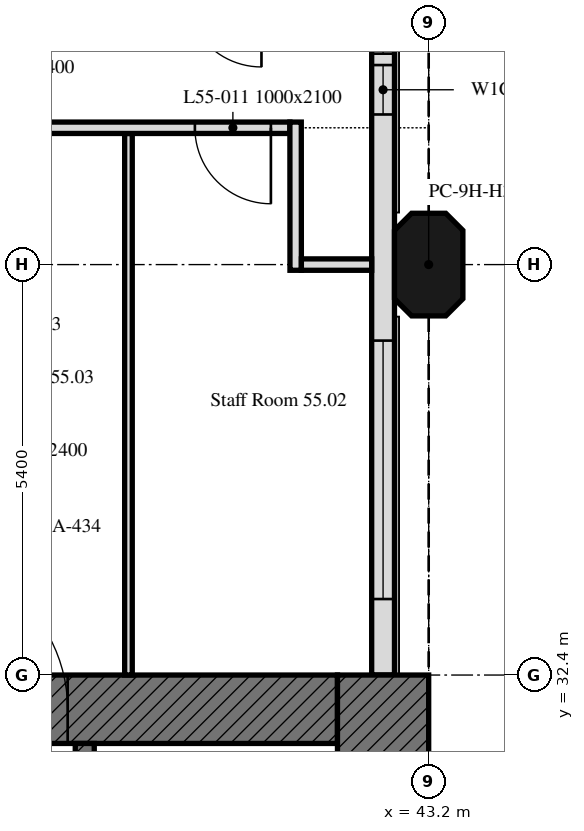
"""IFC4 building model, lengths in metres.
Left out: names, types, materials, properties, quantities, classifications, styles, units other than length and angle.
Written with IfcOpenShell. Run it as: python <this file> out.ifc"""

import sys

from ifc_helpers import new_model, si_unit, direction, frame, frame_2d, origin, place, context, subcontext, project, spatial, polyline, rectangle, outline, extrude, element, fill, save


model = new_model("IFC4")
c1 = context("Model", 3, precision=1e-05, world=origin(), true_north=direction((0.0, 1.0)))
c2 = subcontext(c1, "Body", "Model", "MODEL_VIEW")
j1 = project(units=[si_unit("LENGTHUNIT", "METRE"), si_unit("PLANEANGLEUNIT", "RADIAN")], contexts=[c1])
p1 = place(None, origin())
s1 = spatial("IfcSite", under=j1, at=p1, CompositionType="ELEMENT")
p2 = place(p1, origin())
s2 = spatial("IfcBuilding", under=s1, at=p2, CompositionType="ELEMENT")
p3 = place(p2, frame((0.0, 0.0, 220.3)))
s3 = spatial("IfcBuildingStorey", under=s2, at=p3, CompositionType="ELEMENT", Elevation=220.3)
p4 = place(p3, frame((43.2, 37.8, 0.0), z_axis=(0.0, 0.0, 1.0), x_axis=(0.0, 1.0, 0.0)))
e1 = element("IfcColumn", 1, at=p4, inside=s3, PredefinedType="COLUMN", context=c2, shape_type="SweptSolid", body=[
    extrude(outline(polyline([(-0.45, -0.45), (0.45, -0.45), (0.675, -0.225), (0.675, 0.225), (0.45, 0.45), (-0.45, 0.45), (-0.675, 0.225), (-0.675, -0.225), (-0.45, -0.45)])), origin(), (0.0, 0.0, 1.0), 3.0),
])
p5 = place(p3, frame((42.6, 32.4, 0.0), z_axis=(0.0, 0.0, 1.0), x_axis=(0.0, 1.0, 0.0)))
e2 = element("IfcWall", 2, at=p5, inside=s3, PredefinedType="SOLIDWALL", context=c2, shape_type="SweptSolid", body=[
    extrude(rectangle(XDim=10.614, YDim=0.3, at=frame_2d((5.307, 0.0))), origin(), (0.0, 0.0, 1.0), 3.0),
])
p6 = place(p5, frame((1.0, 0.0, 0.9)))
e3 = element("IfcOpeningElement", 3, at=p6, cuts=e2, PredefinedType="OPENING", context=c2, shape_type="SweptSolid", body=[
    extrude(rectangle(XDim=3.4, YDim=1.7, at=frame_2d((1.7, 0.85))), frame((0.0, 0.16, 0.0), z_axis=(0.0, -1.0, 0.0), x_axis=(1.0, 0.0, 0.0)), (0.0, 0.0, 1.0), 0.32),
])
p7 = place(p5, frame((7.375, 0.0, 0.9)))
e4 = element("IfcOpeningElement", 4, at=p7, cuts=e2, PredefinedType="OPENING", context=c2, shape_type="SweptSolid", body=[
    extrude(rectangle(XDim=0.65, YDim=1.7, at=frame_2d((0.325, 0.85))), frame((0.0, 0.16, 0.0), z_axis=(0.0, -1.0, 0.0), x_axis=(1.0, 0.0, 0.0)), (0.0, 0.0, 1.0), 0.32),
])
p8 = place(p5, frame((8.175, 0.0, 0.9)))
e5 = element("IfcOpeningElement", 5, at=p8, cuts=e2, PredefinedType="OPENING", context=c2, shape_type="SweptSolid", body=[
    extrude(rectangle(XDim=0.65, YDim=1.7, at=frame_2d((0.325, 0.85))), frame((0.0, 0.16, 0.0), z_axis=(0.0, -1.0, 0.0), x_axis=(1.0, 0.0, 0.0)), (0.0, 0.0, 1.0), 0.32),
])
p9 = place(p3, frame((30.9, 31.95, 0.0), z_axis=(0.0, 0.0, 1.0), x_axis=(1.0, 0.0, 0.0)))
e6 = element("IfcWall", 6, at=p9, inside=s3, PredefinedType="SOLIDWALL", context=c2, shape_type="SweptSolid", body=[
    extrude(rectangle(XDim=11.1, YDim=0.9, at=frame_2d((5.55, 0.0))), origin(), (0.0, 0.0, 1.0), 3.0),
])
p10 = place(p9, frame((5.55, 0.0, 0.0)))
e7 = element("IfcOpeningElement", 7, at=p10, cuts=e6, PredefinedType="OPENING", context=c2, shape_type="SweptSolid", body=[
    extrude(rectangle(XDim=2.0, YDim=2.4, at=frame_2d((1.0, 1.2))), frame((0.0, 0.45, 0.0), z_axis=(0.0, -1.0, 0.0), x_axis=(1.0, 0.0, 0.0)), (0.0, 0.0, 1.0), 0.9),
])
p11 = place(p3, frame((42.6, 32.4, 0.0), z_axis=(0.0, 0.0, 1.0), x_axis=(0.0, -1.0, 0.0)))
e8 = element("IfcWall", 8, at=p11, inside=s3, PredefinedType="SOLIDWALL", context=c2, shape_type="SweptSolid", body=[
    extrude(rectangle(XDim=16.2, YDim=1.2, at=frame_2d((8.1, 0.0))), origin(), (0.0, 0.0, 1.0), 3.0),
])
p12 = place(p3, frame((38.675, 17.1, 0.0), z_axis=(0.0, 0.0, 1.0), x_axis=(0.0, 1.0, 0.0)))
e9 = element("IfcWall", 9, at=p12, inside=s3, PredefinedType="SOLIDWALL", context=c2, shape_type="SweptSolid", body=[
    extrude(rectangle(XDim=14.4, YDim=0.25, at=frame_2d((7.2, 0.0))), origin(), (0.0, 0.0, 1.0), 3.0),
])
p13 = place(p12, frame((4.6, 0.0, 0.0)))
e10 = element("IfcOpeningElement", 10, at=p13, cuts=e9, PredefinedType="OPENING", context=c2, shape_type="SweptSolid", body=[
    extrude(rectangle(XDim=1.0, YDim=2.1, at=frame_2d((0.5, 1.05))), frame((0.0, 0.125, 0.0), z_axis=(0.0, -1.0, 0.0), x_axis=(1.0, 0.0, 0.0)), (0.0, 0.0, 1.0), 0.25),
])
p14 = place(p12, frame((7.062, 0.0, 0.0)))
e11 = element("IfcOpeningElement", 11, at=p14, cuts=e9, PredefinedType="OPENING", context=c2, shape_type="SweptSolid", body=[
    extrude(rectangle(XDim=1.2, YDim=2.1, at=frame_2d((0.6, 1.05))), frame((0.0, 0.125, 0.0), z_axis=(0.0, -1.0, 0.0), x_axis=(1.0, 0.0, 0.0)), (0.0, 0.0, 1.0), 0.25),
])
p15 = place(p12, frame((9.599, 0.0, 0.0)))
e12 = element("IfcOpeningElement", 12, at=p15, cuts=e9, PredefinedType="OPENING", context=c2, shape_type="SweptSolid", body=[
    extrude(rectangle(XDim=0.9, YDim=2.1, at=frame_2d((0.45, 1.05))), frame((0.0, 0.125, 0.0), z_axis=(0.0, -1.0, 0.0), x_axis=(1.0, 0.0, 0.0)), (0.0, 0.0, 1.0), 0.25),
])
p16 = place(p12, frame((11.032, 0.0, 0.0)))
e13 = element("IfcOpeningElement", 13, at=p16, cuts=e9, PredefinedType="OPENING", context=c2, shape_type="SweptSolid", body=[
    extrude(rectangle(XDim=0.9, YDim=2.1, at=frame_2d((0.45, 1.05))), frame((0.0, 0.125, 0.0), z_axis=(0.0, -1.0, 0.0), x_axis=(1.0, 0.0, 0.0)), (0.0, 0.0, 1.0), 0.25),
])
p17 = place(p12, frame((12.846, 0.0, 0.0)))
e14 = element("IfcOpeningElement", 14, at=p17, cuts=e9, PredefinedType="OPENING", context=c2, shape_type="SweptSolid", body=[
    extrude(rectangle(XDim=0.9, YDim=2.1, at=frame_2d((0.45, 1.05))), frame((0.0, 0.125, 0.0), z_axis=(0.0, -1.0, 0.0), x_axis=(1.0, 0.0, 0.0)), (0.0, 0.0, 1.0), 0.25),
])
p18 = place(p3, frame((39.25, 32.4, 0.0), z_axis=(0.0, 0.0, 1.0), x_axis=(0.0, 1.0, 0.0)))
e15 = element("IfcWall", 15, at=p18, inside=s3, PredefinedType="PARTITIONING", context=c2, shape_type="SweptSolid", body=[
    extrude(rectangle(XDim=7.125, YDim=0.1, at=frame_2d((3.562, 0.0))), origin(), (0.0, 0.0, 1.0), 3.0),
])
p19 = place(p3, frame((41.374, 39.6, 0.0), z_axis=(0.0, 0.0, 1.0), x_axis=(-1.0, 0.0, 0.0)))
e16 = element("IfcWall", 16, at=p19, inside=s3, PredefinedType="PARTITIONING", context=c2, shape_type="SweptSolid", body=[
    extrude(rectangle(XDim=35.899, YDim=0.15, at=frame_2d((17.949, 0.0))), origin(), (0.0, 0.0, 1.0), 2.4),
])
p20 = place(p19, frame((0.25, 0.0, 0.0)))
e17 = element("IfcOpeningElement", 17, at=p20, cuts=e16, PredefinedType="OPENING", context=c2, shape_type="SweptSolid", body=[
    extrude(rectangle(XDim=1.0, YDim=2.1, at=frame_2d((0.5, 1.05))), frame((0.0, 0.075, 0.0), z_axis=(0.0, -1.0, 0.0), x_axis=(1.0, 0.0, 0.0)), (0.0, 0.0, 1.0), 0.15),
])
p21 = place(p19, frame((27.124, 0.0, 0.0)))
e18 = element("IfcOpeningElement", 18, at=p21, cuts=e16, PredefinedType="OPENING", context=c2, shape_type="SweptSolid", body=[
    extrude(rectangle(XDim=1.0, YDim=2.1, at=frame_2d((0.5, 1.05))), frame((0.0, 0.075, 0.0), z_axis=(0.0, -1.0, 0.0), x_axis=(1.0, 0.0, 0.0)), (0.0, 0.0, 1.0), 0.15),
])
p22 = place(p19, frame((6.024, 0.0, 0.0)))
e19 = element("IfcOpeningElement", 19, at=p22, cuts=e16, PredefinedType="OPENING", context=c2, shape_type="SweptSolid", body=[
    extrude(rectangle(XDim=1.0, YDim=2.1, at=frame_2d((0.5, 1.05))), frame((0.0, 0.075, 0.0), z_axis=(0.0, -1.0, 0.0), x_axis=(1.0, 0.0, 0.0)), (0.0, 0.0, 1.0), 0.15),
])
p23 = place(p19, frame((11.974, 0.0, 0.0)))
e20 = element("IfcOpeningElement", 20, at=p23, cuts=e16, PredefinedType="OPENING", context=c2, shape_type="SweptSolid", body=[
    extrude(rectangle(XDim=1.0, YDim=2.1, at=frame_2d((0.5, 1.05))), frame((0.0, 0.075, 0.0), z_axis=(0.0, -1.0, 0.0), x_axis=(1.0, 0.0, 0.0)), (0.0, 0.0, 1.0), 0.15),
])
p24 = place(p19, frame((15.774, 0.0, 0.0)))
e21 = element("IfcOpeningElement", 21, at=p24, cuts=e16, PredefinedType="OPENING", context=c2, shape_type="SweptSolid", body=[
    extrude(rectangle(XDim=1.0, YDim=2.1, at=frame_2d((0.5, 1.05))), frame((0.0, 0.075, 0.0), z_axis=(0.0, -1.0, 0.0), x_axis=(1.0, 0.0, 0.0)), (0.0, 0.0, 1.0), 0.15),
])
p25 = place(p19, frame((22.774, 0.0, 0.0)))
e22 = element("IfcOpeningElement", 22, at=p25, cuts=e16, PredefinedType="OPENING", context=c2, shape_type="SweptSolid", body=[
    extrude(rectangle(XDim=1.0, YDim=2.1, at=frame_2d((0.5, 1.05))), frame((0.0, 0.075, 0.0), z_axis=(0.0, -1.0, 0.0), x_axis=(1.0, 0.0, 0.0)), (0.0, 0.0, 1.0), 0.15),
])
p26 = place(p19, frame((3.754, 0.0, 0.0)))
e23 = element("IfcOpeningElement", 23, at=p26, cuts=e16, PredefinedType="OPENING", context=c2, shape_type="SweptSolid", body=[
    extrude(rectangle(XDim=1.8, YDim=2.4, at=frame_2d((0.9, 1.2))), frame((0.0, 0.075, 0.0), z_axis=(0.0, -1.0, 0.0), x_axis=(1.0, 0.0, 0.0)), (0.0, 0.0, 1.0), 0.15),
])
p27 = place(p19, frame((29.124, 0.0, 0.0)))
e24 = element("IfcOpeningElement", 24, at=p27, cuts=e16, PredefinedType="OPENING", context=c2, shape_type="SweptSolid", body=[
    extrude(rectangle(XDim=1.0, YDim=2.1, at=frame_2d((0.5, 1.05))), frame((0.0, 0.075, 0.0), z_axis=(0.0, -1.0, 0.0), x_axis=(1.0, 0.0, 0.0)), (0.0, 0.0, 1.0), 0.15),
])
p28 = place(p3, frame((41.449, 39.675, 0.0), z_axis=(0.0, 0.0, 1.0), x_axis=(0.00050081376, -0.999999874593, 0.0)))
e25 = element("IfcWall", 25, at=p28, inside=s3, PredefinedType="PARTITIONING", context=c2, shape_type="SweptSolid", body=[
    extrude(rectangle(XDim=1.95, YDim=0.15, at=frame_2d((0.975, 0.0))), origin(), (0.0, 0.0, 1.0), 3.0),
])
p29 = place(p3, frame((41.525, 37.8, 0.0), z_axis=(0.0, 0.0, 1.0), x_axis=(1.0, 0.0, 0.0)))
e26 = element("IfcWall", 26, at=p29, inside=s3, PredefinedType="PARTITIONING", context=c2, shape_type="SweptSolid", body=[
    extrude(rectangle(XDim=0.925, YDim=0.15, at=frame_2d((0.462, 0.0))), origin(), (0.0, 0.0, 1.0), 3.0),
])
p30 = place(p6, origin())
e27 = element("IfcWindow", 27, at=p30, inside=s3, PartitioningType="SINGLE_PANEL", PredefinedType="WINDOW", context=c2, shape_type="SweptSolid", body=[
    extrude(rectangle(XDim=3.4, YDim=1.7, at=frame_2d((1.7, 0.85))), frame((0.0, 0.03, 0.0), z_axis=(0.0, -1.0, 0.0), x_axis=(1.0, 0.0, 0.0)), (0.0, 0.0, 1.0), 0.06),
])
fill(e3, e27)
p31 = place(p7, origin())
e28 = element("IfcWindow", 28, at=p31, inside=s3, PartitioningType="SINGLE_PANEL", PredefinedType="WINDOW", context=c2, shape_type="SweptSolid", body=[
    extrude(rectangle(XDim=0.65, YDim=1.7, at=frame_2d((0.325, 0.85))), frame((0.0, 0.03, 0.0), z_axis=(0.0, -1.0, 0.0), x_axis=(1.0, 0.0, 0.0)), (0.0, 0.0, 1.0), 0.06),
])
fill(e4, e28)
p32 = place(p8, origin())
e29 = element("IfcWindow", 29, at=p32, inside=s3, PartitioningType="SINGLE_PANEL", PredefinedType="WINDOW", context=c2, shape_type="SweptSolid", body=[
    extrude(rectangle(XDim=0.65, YDim=1.7, at=frame_2d((0.325, 0.85))), frame((0.0, 0.03, 0.0), z_axis=(0.0, -1.0, 0.0), x_axis=(1.0, 0.0, 0.0)), (0.0, 0.0, 1.0), 0.06),
])
fill(e5, e29)
p33 = place(p10, origin())
e30 = element("IfcDoor", 30, at=p33, inside=s3, OperationType="DOUBLE_DOOR_SINGLE_SWING", PredefinedType="DOOR", context=c2, shape_type="SweptSolid", body=[
    extrude(rectangle(XDim=2.0, YDim=2.4, at=frame_2d((1.0, 1.2))), frame((0.0, 0.025, 0.0), z_axis=(0.0, -1.0, 0.0), x_axis=(1.0, 0.0, 0.0)), (0.0, 0.0, 1.0), 0.05),
])
fill(e7, e30)
p34 = place(p20, origin())
e31 = element("IfcDoor", 31, at=p34, inside=s3, OperationType="SINGLE_SWING_LEFT", PredefinedType="DOOR", context=c2, shape_type="SweptSolid", body=[
    extrude(rectangle(XDim=1.0, YDim=2.1, at=frame_2d((0.5, 1.05))), frame((0.0, 0.025, 0.0), z_axis=(0.0, -1.0, 0.0), x_axis=(1.0, 0.0, 0.0)), (0.0, 0.0, 1.0), 0.05),
])
fill(e17, e31)
save(model, sys.argv[1])
